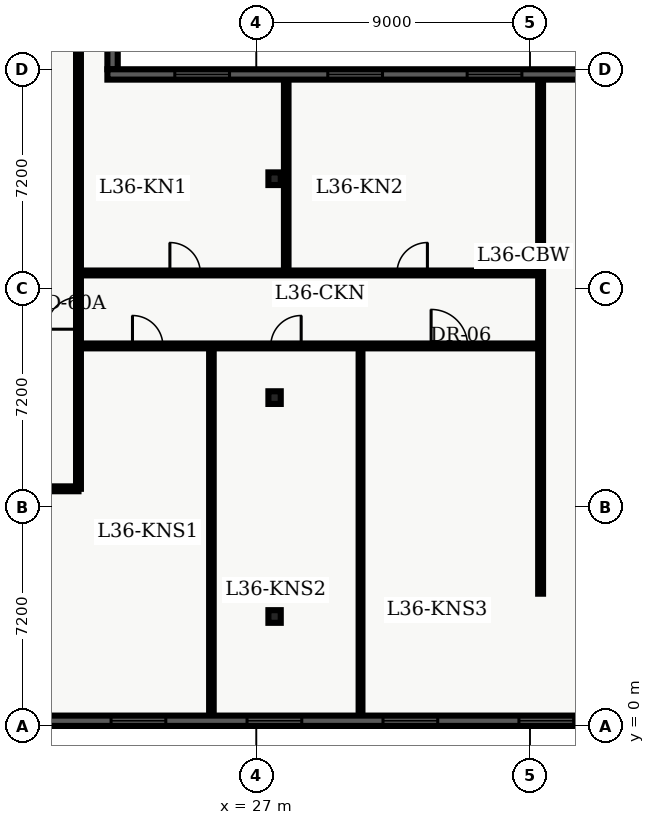
"""IFC4 building model, lengths in metres.
Left out: names, types, materials, properties, quantities, classifications, styles, units other than length and angle.
Written with IfcOpenShell. Run it as: python <this file> out.ifc"""

import sys

from ifc_helpers import new_model, entity, si_unit, converted_unit, direction, frame, origin_with_axes, origin_2d_with_axis, place, context, subcontext, project, spatial, polyline, rectangle, i_section, outline, extrude, element, fill, save


model = new_model("IFC4")
c1 = context("Model", 3, precision=1e-05, world=origin_with_axes(), true_north=direction((0.0, 1.0)))
c2 = subcontext(c1, "Body", "Model", "MODEL_VIEW")
j1 = project(units=[si_unit("LENGTHUNIT", "METRE"), converted_unit("PLANEANGLEUNIT", "DEGREE", entity("IfcPlaneAngleMeasure", 0.017), si_unit("PLANEANGLEUNIT", "RADIAN"), dimensions=[0, 0, 0, 0, 0, 0, 0])], contexts=[c1])
p1 = place(None, origin_with_axes())
s1 = spatial("IfcSite", under=j1, at=p1, CompositionType="ELEMENT")
p2 = place(p1, origin_with_axes())
s2 = spatial("IfcBuilding", under=s1, at=p2, CompositionType="ELEMENT")
p3 = place(p2, frame((0.0, 0.0, 148.5), z_axis=(0.0, 0.0, 1.0), x_axis=(1.0, 0.0, 0.0)))
s3 = spatial("IfcBuildingStorey", under=s2, at=p3, CompositionType="ELEMENT", Elevation=148.5)
for number, where, z_axis, x_axis in (
    (1, (27.6, 3.6, 0.0), (0.0, 0.0, 1.0), (1.0, 0.0, 0.0)),
    (2, (27.6, 10.8, 0.0), (0.0, 0.0, 1.0), (1.0, 0.0, 0.0)),
    (3, (27.6, 18.0, 0.0), (0.0, 0.0, 1.0), (1.0, 0.0, 0.0)),
):
    element("IfcColumn", number, at=place(p3, frame(where, z_axis=z_axis, x_axis=x_axis)), inside=s3, PredefinedType="COLUMN", context=c2, shape_type="SweptSolid", body=[
        extrude(i_section(OverallWidth=0.406, OverallDepth=0.416, WebThickness=0.03, FlangeThickness=0.048, FilletRadius=0.022, at=origin_2d_with_axis()), origin_with_axes(), (0.0, 0.0, 1.0), 3.9),
    ])
p4 = place(p3, frame((2.6, 7.8, 0.0), z_axis=(0.0, 0.0, 1.0), x_axis=(1.0, 0.0, 0.0)))
e4 = element("IfcWall", 4, at=p4, inside=s3, PredefinedType="PARTITIONING", context=c2, shape_type="SweptSolid", body=[
    extrude(outline(polyline([(0.0, -0.08), (18.55, -0.08), (18.55, 0.08), (0.0, 0.08), (0.0, -0.08)])), origin_with_axes(), (0.0, 0.0, 1.0), 2.7),
])
p5 = place(p4, frame((3.737, 0.0, 0.0), z_axis=(0.0, 0.0, 1.0), x_axis=(1.0, 0.0, 0.0)))
e5 = element("IfcOpeningElement", 5, at=p5, cuts=e4, PredefinedType="OPENING", context=c2, shape_type="SweptSolid", body=[
    extrude(rectangle(XDim=1.0, YDim=0.18, at=origin_2d_with_axis()), origin_with_axes(), (0.0, 0.0, 1.0), 2.15),
])
p6 = place(p4, frame((13.273, 0.0, 0.0), z_axis=(0.0, 0.0, 1.0), x_axis=(1.0, 0.0, 0.0)))
e6 = element("IfcOpeningElement", 6, at=p6, cuts=e4, PredefinedType="OPENING", context=c2, shape_type="SweptSolid", body=[
    extrude(rectangle(XDim=1.0, YDim=0.18, at=origin_2d_with_axis()), origin_with_axes(), (0.0, 0.0, 1.0), 2.15),
])
p7 = place(p3, frame((21.15, 7.8, 0.0), z_axis=(0.0, 0.0, 1.0), x_axis=(0.0, 1.0, 0.0)))
e7 = element("IfcWall", 7, at=p7, inside=s3, PredefinedType="PARTITIONING", context=c2, shape_type="SweptSolid", body=[
    extrude(outline(polyline([(0.0, -0.08), (32.7, -0.08), (32.7, 0.08), (0.0, 0.08), (0.0, -0.08)])), origin_with_axes(), (0.0, 0.0, 1.0), 2.7),
])
p8 = place(p7, frame((5.775, 0.0, 0.0), z_axis=(0.0, 0.0, 1.0), x_axis=(1.0, 0.0, 0.0)))
e8 = element("IfcOpeningElement", 8, at=p8, cuts=e7, PredefinedType="OPENING", context=c2, shape_type="SweptSolid", body=[
    extrude(rectangle(XDim=1.05, YDim=0.18, at=origin_2d_with_axis()), origin_with_axes(), (0.0, 0.0, 1.0), 2.15),
])
p9 = place(p3, frame((21.15, 12.5, 0.0), z_axis=(0.0, 0.0, 1.0), x_axis=(1.0, 0.0, 0.0)))
e9 = element("IfcWall", 9, at=p9, inside=s3, PredefinedType="PARTITIONING", context=c2, shape_type="SweptSolid", body=[
    extrude(outline(polyline([(0.0, -0.08), (15.2, -0.08), (15.2, 0.08), (0.0, 0.08), (0.0, -0.08)])), origin_with_axes(), (0.0, 0.0, 1.0), 2.7),
])
p10 = place(p9, frame((2.276, 0.0, 0.0), z_axis=(0.0, 0.0, 1.0), x_axis=(1.0, 0.0, 0.0)))
e10 = element("IfcOpeningElement", 10, at=p10, cuts=e9, PredefinedType="OPENING", context=c2, shape_type="SweptSolid", body=[
    extrude(rectangle(XDim=1.0, YDim=0.18, at=origin_2d_with_axis()), origin_with_axes(), (0.0, 0.0, 1.0), 2.15),
])
p11 = place(p9, frame((6.824, 0.0, 0.0), z_axis=(0.0, 0.0, 1.0), x_axis=(1.0, 0.0, 0.0)))
e11 = element("IfcOpeningElement", 11, at=p11, cuts=e9, PredefinedType="OPENING", context=c2, shape_type="SweptSolid", body=[
    extrude(rectangle(XDim=1.0, YDim=0.18, at=origin_2d_with_axis()), origin_with_axes(), (0.0, 0.0, 1.0), 2.15),
])
p12 = place(p9, frame((12.198, 0.0, 0.0), z_axis=(0.0, 0.0, 1.0), x_axis=(1.0, 0.0, 0.0)))
e12 = element("IfcOpeningElement", 12, at=p12, cuts=e9, PredefinedType="OPENING", context=c2, shape_type="SweptSolid", body=[
    extrude(rectangle(XDim=1.2, YDim=0.18, at=origin_2d_with_axis()), origin_with_axes(), (0.0, 0.0, 1.0), 2.2),
])
p13 = place(p3, frame((21.15, 14.9, 0.0), z_axis=(0.0, 0.0, 1.0), x_axis=(1.0, 0.0, 0.0)))
e13 = element("IfcWall", 13, at=p13, inside=s3, PredefinedType="PARTITIONING", context=c2, shape_type="SweptSolid", body=[
    extrude(outline(polyline([(0.0, -0.08), (15.2, -0.08), (15.2, 0.08), (0.0, 0.08), (0.0, -0.08)])), origin_with_axes(), (0.0, 0.0, 1.0), 2.7),
])
p14 = place(p13, frame((3.506, 0.0, 0.0), z_axis=(0.0, 0.0, 1.0), x_axis=(1.0, 0.0, 0.0)))
e14 = element("IfcOpeningElement", 14, at=p14, cuts=e13, PredefinedType="OPENING", context=c2, shape_type="SweptSolid", body=[
    extrude(rectangle(XDim=1.0, YDim=0.18, at=origin_2d_with_axis()), origin_with_axes(), (0.0, 0.0, 1.0), 2.15),
])
p15 = place(p13, frame((10.976, 0.0, 0.0), z_axis=(0.0, 0.0, 1.0), x_axis=(1.0, 0.0, 0.0)))
e15 = element("IfcOpeningElement", 15, at=p15, cuts=e13, PredefinedType="OPENING", context=c2, shape_type="SweptSolid", body=[
    extrude(rectangle(XDim=1.0, YDim=0.18, at=origin_2d_with_axis()), origin_with_axes(), (0.0, 0.0, 1.0), 2.15),
])
p16 = place(p3, frame((36.35, 4.35, 0.0), z_axis=(0.0, 0.0, 1.0), x_axis=(0.0, 1.0, 0.0)))
e16 = element("IfcWall", 16, at=p16, inside=s3, PredefinedType="PARTITIONING", context=c2, shape_type="SweptSolid", body=[
    extrude(outline(polyline([(0.0, -0.08), (16.95, -0.08), (16.95, 0.08), (0.0, 0.08), (0.0, -0.08)])), origin_with_axes(), (0.0, 0.0, 1.0), 2.7),
])
p17 = place(p3, frame((25.522, 0.335, 0.0), z_axis=(0.0, 0.0, 1.0), x_axis=(0.0, 1.0, 0.0)))
e17 = element("IfcWall", 17, at=p17, inside=s3, PredefinedType="PARTITIONING", context=c2, shape_type="SweptSolid", body=[
    extrude(outline(polyline([(0.0, -0.075), (12.045, -0.075), (12.045, 0.075), (0.0, 0.075), (0.0, -0.075)])), origin_with_axes(), (0.0, 0.0, 1.0), 2.7),
])
p18 = place(p3, frame((30.427, 0.335, 0.0), z_axis=(0.0, 0.0, 1.0), x_axis=(0.0, 1.0, 0.0)))
e18 = element("IfcWall", 18, at=p18, inside=s3, PredefinedType="PARTITIONING", context=c2, shape_type="SweptSolid", body=[
    extrude(outline(polyline([(0.0, -0.062), (12.045, -0.062), (12.045, 0.062), (0.0, 0.062), (0.0, -0.062)])), origin_with_axes(), (0.0, 0.0, 1.0), 2.7),
])
p19 = place(p3, frame((27.983, 15.02, 0.0), z_axis=(0.0, 0.0, 1.0), x_axis=(0.0, 1.0, 0.0)))
e19 = element("IfcWall", 19, at=p19, inside=s3, PredefinedType="PARTITIONING", context=c2, shape_type="SweptSolid", body=[
    extrude(outline(polyline([(0.0, -0.075), (6.245, -0.075), (6.245, 0.075), (0.0, 0.075), (0.0, -0.075)])), origin_with_axes(), (0.0, 0.0, 1.0), 2.7),
])
p20 = place(p3, frame((57.26, 0.17, 0.0), z_axis=(0.0, 0.0, 1.0), x_axis=(-1.0, 0.0, 0.0)))
e20 = element("IfcWall", 20, at=p20, inside=s3, PredefinedType="SOLIDWALL", context=c2, shape_type="SweptSolid", body=[
    extrude(outline(polyline([(0.0, -0.17), (54.86, -0.17), (54.86, 0.17), (0.0, 0.17), (0.0, -0.17)])), origin_with_axes(), (0.0, 0.0, 1.0), 3.66),
])
p21 = place(p20, frame((2.836, 0.0, 0.45), z_axis=(0.0, 0.0, 1.0), x_axis=(1.0, 0.0, 0.0)))
e21 = element("IfcOpeningElement", 21, at=p21, cuts=e20, PredefinedType="OPENING", context=c2, shape_type="SweptSolid", body=[
    extrude(rectangle(XDim=1.8, YDim=0.36, at=origin_2d_with_axis()), origin_with_axes(), (0.0, 0.0, 1.0), 2.1),
])
p22 = place(p20, frame((7.307, 0.0, 0.45), z_axis=(0.0, 0.0, 1.0), x_axis=(1.0, 0.0, 0.0)))
e22 = element("IfcOpeningElement", 22, at=p22, cuts=e20, PredefinedType="OPENING", context=c2, shape_type="SweptSolid", body=[
    extrude(rectangle(XDim=1.8, YDim=0.36, at=origin_2d_with_axis()), origin_with_axes(), (0.0, 0.0, 1.0), 2.1),
])
p23 = place(p20, frame((11.779, 0.0, 0.45), z_axis=(0.0, 0.0, 1.0), x_axis=(1.0, 0.0, 0.0)))
e23 = element("IfcOpeningElement", 23, at=p23, cuts=e20, PredefinedType="OPENING", context=c2, shape_type="SweptSolid", body=[
    extrude(rectangle(XDim=1.8, YDim=0.36, at=origin_2d_with_axis()), origin_with_axes(), (0.0, 0.0, 1.0), 2.1),
])
p24 = place(p20, frame((16.251, 0.0, 0.45), z_axis=(0.0, 0.0, 1.0), x_axis=(1.0, 0.0, 0.0)))
e24 = element("IfcOpeningElement", 24, at=p24, cuts=e20, PredefinedType="OPENING", context=c2, shape_type="SweptSolid", body=[
    extrude(rectangle(XDim=1.8, YDim=0.36, at=origin_2d_with_axis()), origin_with_axes(), (0.0, 0.0, 1.0), 2.1),
])
p25 = place(p20, frame((20.723, 0.0, 0.45), z_axis=(0.0, 0.0, 1.0), x_axis=(1.0, 0.0, 0.0)))
e25 = element("IfcOpeningElement", 25, at=p25, cuts=e20, PredefinedType="OPENING", context=c2, shape_type="SweptSolid", body=[
    extrude(rectangle(XDim=1.8, YDim=0.36, at=origin_2d_with_axis()), origin_with_axes(), (0.0, 0.0, 1.0), 2.1),
])
p26 = place(p20, frame((25.194, 0.0, 0.45), z_axis=(0.0, 0.0, 1.0), x_axis=(1.0, 0.0, 0.0)))
e26 = element("IfcOpeningElement", 26, at=p26, cuts=e20, PredefinedType="OPENING", context=c2, shape_type="SweptSolid", body=[
    extrude(rectangle(XDim=1.8, YDim=0.36, at=origin_2d_with_axis()), origin_with_axes(), (0.0, 0.0, 1.0), 2.1),
])
p27 = place(p20, frame((29.666, 0.0, 0.45), z_axis=(0.0, 0.0, 1.0), x_axis=(1.0, 0.0, 0.0)))
e27 = element("IfcOpeningElement", 27, at=p27, cuts=e20, PredefinedType="OPENING", context=c2, shape_type="SweptSolid", body=[
    extrude(rectangle(XDim=1.8, YDim=0.36, at=origin_2d_with_axis()), origin_with_axes(), (0.0, 0.0, 1.0), 2.1),
])
p28 = place(p20, frame((34.138, 0.0, 0.45), z_axis=(0.0, 0.0, 1.0), x_axis=(1.0, 0.0, 0.0)))
e28 = element("IfcOpeningElement", 28, at=p28, cuts=e20, PredefinedType="OPENING", context=c2, shape_type="SweptSolid", body=[
    extrude(rectangle(XDim=1.8, YDim=0.36, at=origin_2d_with_axis()), origin_with_axes(), (0.0, 0.0, 1.0), 2.1),
])
p29 = place(p20, frame((38.609, 0.0, 0.45), z_axis=(0.0, 0.0, 1.0), x_axis=(1.0, 0.0, 0.0)))
e29 = element("IfcOpeningElement", 29, at=p29, cuts=e20, PredefinedType="OPENING", context=c2, shape_type="SweptSolid", body=[
    extrude(rectangle(XDim=1.8, YDim=0.36, at=origin_2d_with_axis()), origin_with_axes(), (0.0, 0.0, 1.0), 2.1),
])
p30 = place(p20, frame((43.081, 0.0, 0.45), z_axis=(0.0, 0.0, 1.0), x_axis=(1.0, 0.0, 0.0)))
e30 = element("IfcOpeningElement", 30, at=p30, cuts=e20, PredefinedType="OPENING", context=c2, shape_type="SweptSolid", body=[
    extrude(rectangle(XDim=1.8, YDim=0.36, at=origin_2d_with_axis()), origin_with_axes(), (0.0, 0.0, 1.0), 2.1),
])
p31 = place(p20, frame((48.403, 0.0, 0.45), z_axis=(0.0, 0.0, 1.0), x_axis=(1.0, 0.0, 0.0)))
e31 = element("IfcOpeningElement", 31, at=p31, cuts=e20, PredefinedType="OPENING", context=c2, shape_type="SweptSolid", body=[
    extrude(rectangle(XDim=1.8, YDim=0.36, at=origin_2d_with_axis()), origin_with_axes(), (0.0, 0.0, 1.0), 2.1),
])
p32 = place(p20, frame((52.024, 0.0, 0.45), z_axis=(0.0, 0.0, 1.0), x_axis=(1.0, 0.0, 0.0)))
e32 = element("IfcOpeningElement", 32, at=p32, cuts=e20, PredefinedType="OPENING", context=c2, shape_type="SweptSolid", body=[
    extrude(rectangle(XDim=1.8, YDim=0.36, at=origin_2d_with_axis()), origin_with_axes(), (0.0, 0.0, 1.0), 2.1),
])
p33 = place(p3, frame((22.271, 46.22, 0.0), z_axis=(0.0, 0.0, 1.0), x_axis=(0.0, -1.0, 0.0)))
e33 = element("IfcWall", 33, at=p33, inside=s3, PredefinedType="SOLIDWALL", context=c2, shape_type="SweptSolid", body=[
    extrude(outline(polyline([(0.0, -0.17), (24.62, -0.17), (24.62, 0.17), (0.0, 0.17), (0.0, -0.17)])), origin_with_axes(), (0.0, 0.0, 1.0), 3.66),
])
p34 = place(p33, frame((2.942, 0.0, 0.45), z_axis=(0.0, 0.0, 1.0), x_axis=(1.0, 0.0, 0.0)))
e34 = element("IfcOpeningElement", 34, at=p34, cuts=e33, PredefinedType="OPENING", context=c2, shape_type="SweptSolid", body=[
    extrude(rectangle(XDim=1.6, YDim=0.36, at=origin_2d_with_axis()), origin_with_axes(), (0.0, 0.0, 1.0), 2.2),
])
p35 = place(p33, frame((7.626, 0.0, 0.45), z_axis=(0.0, 0.0, 1.0), x_axis=(1.0, 0.0, 0.0)))
e35 = element("IfcOpeningElement", 35, at=p35, cuts=e33, PredefinedType="OPENING", context=c2, shape_type="SweptSolid", body=[
    extrude(rectangle(XDim=1.6, YDim=0.36, at=origin_2d_with_axis()), origin_with_axes(), (0.0, 0.0, 1.0), 2.2),
])
p36 = place(p33, frame((12.31, 0.0, 0.45), z_axis=(0.0, 0.0, 1.0), x_axis=(1.0, 0.0, 0.0)))
e36 = element("IfcOpeningElement", 36, at=p36, cuts=e33, PredefinedType="OPENING", context=c2, shape_type="SweptSolid", body=[
    extrude(rectangle(XDim=1.6, YDim=0.36, at=origin_2d_with_axis()), origin_with_axes(), (0.0, 0.0, 1.0), 2.2),
])
p37 = place(p33, frame((16.994, 0.0, 0.45), z_axis=(0.0, 0.0, 1.0), x_axis=(1.0, 0.0, 0.0)))
e37 = element("IfcOpeningElement", 37, at=p37, cuts=e33, PredefinedType="OPENING", context=c2, shape_type="SweptSolid", body=[
    extrude(rectangle(XDim=1.6, YDim=0.36, at=origin_2d_with_axis()), origin_with_axes(), (0.0, 0.0, 1.0), 2.2),
])
p38 = place(p33, frame((21.678, 0.0, 0.45), z_axis=(0.0, 0.0, 1.0), x_axis=(1.0, 0.0, 0.0)))
e38 = element("IfcOpeningElement", 38, at=p38, cuts=e33, PredefinedType="OPENING", context=c2, shape_type="SweptSolid", body=[
    extrude(rectangle(XDim=1.6, YDim=0.36, at=origin_2d_with_axis()), origin_with_axes(), (0.0, 0.0, 1.0), 2.2),
])
p39 = place(p3, frame((22.101, 21.43, 0.0), z_axis=(0.0, 0.0, 1.0), x_axis=(1.0, 0.0, 0.0)))
e39 = element("IfcWall", 39, at=p39, inside=s3, PredefinedType="SOLIDWALL", context=c2, shape_type="SweptSolid", body=[
    extrude(outline(polyline([(0.0, -0.17), (16.299, -0.17), (16.299, 0.17), (0.0, 0.17), (0.0, -0.17)])), origin_with_axes(), (0.0, 0.0, 1.0), 3.66),
])
p40 = place(p39, frame((3.117, 0.0, 0.45), z_axis=(0.0, 0.0, 1.0), x_axis=(1.0, 0.0, 0.0)))
e40 = element("IfcOpeningElement", 40, at=p40, cuts=e39, PredefinedType="OPENING", context=c2, shape_type="SweptSolid", body=[
    extrude(rectangle(XDim=1.8, YDim=0.36, at=origin_2d_with_axis()), origin_with_axes(), (0.0, 0.0, 1.0), 2.1),
])
p41 = place(p39, frame((8.149, 0.0, 0.45), z_axis=(0.0, 0.0, 1.0), x_axis=(1.0, 0.0, 0.0)))
e41 = element("IfcOpeningElement", 41, at=p41, cuts=e39, PredefinedType="OPENING", context=c2, shape_type="SweptSolid", body=[
    extrude(rectangle(XDim=1.8, YDim=0.36, at=origin_2d_with_axis()), origin_with_axes(), (0.0, 0.0, 1.0), 2.1),
])
p42 = place(p39, frame((12.733, 0.0, 0.45), z_axis=(0.0, 0.0, 1.0), x_axis=(1.0, 0.0, 0.0)))
e42 = element("IfcOpeningElement", 42, at=p42, cuts=e39, PredefinedType="OPENING", context=c2, shape_type="SweptSolid", body=[
    extrude(rectangle(XDim=1.8, YDim=0.36, at=origin_2d_with_axis()), origin_with_axes(), (0.0, 0.0, 1.0), 2.1),
])
p43 = place(p7, frame((5.775, 0.0, 0.0), z_axis=(0.0, 0.0, 1.0), x_axis=(1.0, 0.0, 0.0)))
e43 = element("IfcDoor", 43, at=p43, inside=s3, OperationType="SINGLE_SWING_LEFT", PredefinedType="DOOR", context=c2, shape_type="SweptSolid", body=[
    extrude(rectangle(XDim=1.05, YDim=0.09, at=origin_2d_with_axis()), origin_with_axes(), (0.0, 0.0, 1.0), 2.15),
])
fill(e8, e43)
p44 = place(p9, frame((2.276, 0.0, 0.0), z_axis=(0.0, 0.0, 1.0), x_axis=(1.0, 0.0, 0.0)))
e44 = element("IfcDoor", 44, at=p44, inside=s3, OperationType="SINGLE_SWING_LEFT", PredefinedType="DOOR", context=c2, shape_type="SweptSolid", body=[
    extrude(rectangle(XDim=1.0, YDim=0.09, at=origin_2d_with_axis()), origin_with_axes(), (0.0, 0.0, 1.0), 2.15),
])
fill(e10, e44)
p45 = place(p9, frame((6.824, 0.0, 0.0), z_axis=(0.0, 0.0, 1.0), x_axis=(1.0, 0.0, 0.0)))
e45 = element("IfcDoor", 45, at=p45, inside=s3, OperationType="SINGLE_SWING_RIGHT", PredefinedType="DOOR", context=c2, shape_type="SweptSolid", body=[
    extrude(rectangle(XDim=1.0, YDim=0.09, at=origin_2d_with_axis()), origin_with_axes(), (0.0, 0.0, 1.0), 2.15),
])
fill(e11, e45)
p46 = place(p9, frame((12.198, 0.0, 0.0), z_axis=(0.0, 0.0, 1.0), x_axis=(1.0, 0.0, 0.0)))
e46 = element("IfcDoor", 46, at=p46, inside=s3, OperationType="SINGLE_SWING_LEFT", PredefinedType="DOOR", context=c2, shape_type="SweptSolid", body=[
    extrude(rectangle(XDim=1.2, YDim=0.09, at=origin_2d_with_axis()), origin_with_axes(), (0.0, 0.0, 1.0), 2.2),
])
fill(e12, e46)
p47 = place(p13, frame((3.506, 0.0, 0.0), z_axis=(0.0, 0.0, 1.0), x_axis=(1.0, 0.0, 0.0)))
e47 = element("IfcDoor", 47, at=p47, inside=s3, OperationType="SINGLE_SWING_LEFT", PredefinedType="DOOR", context=c2, shape_type="SweptSolid", body=[
    extrude(rectangle(XDim=1.0, YDim=0.09, at=origin_2d_with_axis()), origin_with_axes(), (0.0, 0.0, 1.0), 2.15),
])
fill(e14, e47)
p48 = place(p13, frame((10.976, 0.0, 0.0), z_axis=(0.0, 0.0, 1.0), x_axis=(1.0, 0.0, 0.0)))
e48 = element("IfcDoor", 48, at=p48, inside=s3, OperationType="SINGLE_SWING_RIGHT", PredefinedType="DOOR", context=c2, shape_type="SweptSolid", body=[
    extrude(rectangle(XDim=1.0, YDim=0.09, at=origin_2d_with_axis()), origin_with_axes(), (0.0, 0.0, 1.0), 2.15),
])
fill(e15, e48)
p49 = place(p20, frame((20.723, 0.0, 0.45), z_axis=(0.0, 0.0, 1.0), x_axis=(1.0, 0.0, 0.0)))
e49 = element("IfcWindow", 49, at=p49, inside=s3, PredefinedType="WINDOW", context=c2, shape_type="SweptSolid", body=[
    extrude(rectangle(XDim=1.8, YDim=0.09, at=origin_2d_with_axis()), origin_with_axes(), (0.0, 0.0, 1.0), 2.1),
])
fill(e25, e49)
p50 = place(p20, frame((25.194, 0.0, 0.45), z_axis=(0.0, 0.0, 1.0), x_axis=(1.0, 0.0, 0.0)))
e50 = element("IfcWindow", 50, at=p50, inside=s3, PredefinedType="WINDOW", context=c2, shape_type="SweptSolid", body=[
    extrude(rectangle(XDim=1.8, YDim=0.09, at=origin_2d_with_axis()), origin_with_axes(), (0.0, 0.0, 1.0), 2.1),
])
fill(e26, e50)
p51 = place(p20, frame((29.666, 0.0, 0.45), z_axis=(0.0, 0.0, 1.0), x_axis=(1.0, 0.0, 0.0)))
e51 = element("IfcWindow", 51, at=p51, inside=s3, PredefinedType="WINDOW", context=c2, shape_type="SweptSolid", body=[
    extrude(rectangle(XDim=1.8, YDim=0.09, at=origin_2d_with_axis()), origin_with_axes(), (0.0, 0.0, 1.0), 2.1),
])
fill(e27, e51)
p52 = place(p20, frame((34.138, 0.0, 0.45), z_axis=(0.0, 0.0, 1.0), x_axis=(1.0, 0.0, 0.0)))
e52 = element("IfcWindow", 52, at=p52, inside=s3, PredefinedType="WINDOW", context=c2, shape_type="SweptSolid", body=[
    extrude(rectangle(XDim=1.8, YDim=0.09, at=origin_2d_with_axis()), origin_with_axes(), (0.0, 0.0, 1.0), 2.1),
])
fill(e28, e52)
p53 = place(p39, frame((3.117, 0.0, 0.45), z_axis=(0.0, 0.0, 1.0), x_axis=(1.0, 0.0, 0.0)))
e53 = element("IfcWindow", 53, at=p53, inside=s3, PredefinedType="WINDOW", context=c2, shape_type="SweptSolid", body=[
    extrude(rectangle(XDim=1.8, YDim=0.09, at=origin_2d_with_axis()), origin_with_axes(), (0.0, 0.0, 1.0), 2.1),
])
fill(e40, e53)
p54 = place(p39, frame((8.149, 0.0, 0.45), z_axis=(0.0, 0.0, 1.0), x_axis=(1.0, 0.0, 0.0)))
e54 = element("IfcWindow", 54, at=p54, inside=s3, PredefinedType="WINDOW", context=c2, shape_type="SweptSolid", body=[
    extrude(rectangle(XDim=1.8, YDim=0.09, at=origin_2d_with_axis()), origin_with_axes(), (0.0, 0.0, 1.0), 2.1),
])
fill(e41, e54)
p55 = place(p39, frame((12.733, 0.0, 0.45), z_axis=(0.0, 0.0, 1.0), x_axis=(1.0, 0.0, 0.0)))
e55 = element("IfcWindow", 55, at=p55, inside=s3, PredefinedType="WINDOW", context=c2, shape_type="SweptSolid", body=[
    extrude(rectangle(XDim=1.8, YDim=0.09, at=origin_2d_with_axis()), origin_with_axes(), (0.0, 0.0, 1.0), 2.1),
])
fill(e42, e55)
save(model, sys.argv[1])
